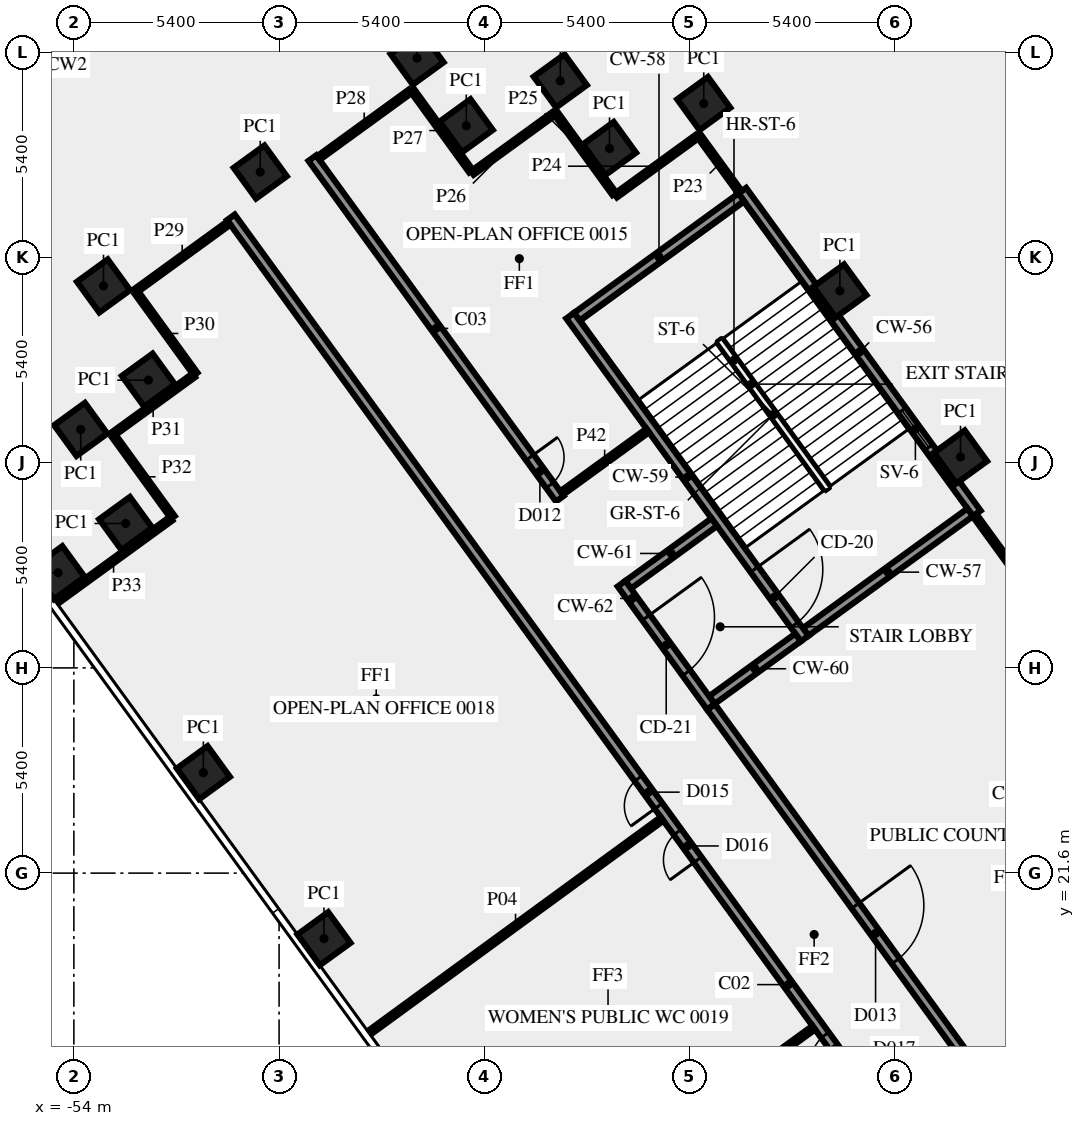
"""IFC4 building model, lengths in metres.
Left out: names, types, materials, properties, quantities, classifications, styles, units other than length and angle.
Written with IfcOpenShell. Run it as: python <this file> out.ifc"""

import sys

from ifc_helpers import new_model, si_unit, direction, frame, frame_2d, origin, origin_2d, place, context, subcontext, project, spatial, rectangle, extrude, element, fill, save


model = new_model("IFC4")
c1 = context("Model", 3, precision=1e-05, world=origin(), true_north=direction((0.0, 1.0)))
c2 = subcontext(c1, "Body", "Model", "MODEL_VIEW")
j1 = project(units=[si_unit("LENGTHUNIT", "METRE"), si_unit("PLANEANGLEUNIT", "RADIAN")], contexts=[c1])
p1 = place(None, origin())
s1 = spatial("IfcSite", under=j1, at=p1, CompositionType="ELEMENT")
p2 = place(p1, origin())
s2 = spatial("IfcBuilding", under=s1, at=p2, CompositionType="ELEMENT")
p3 = place(p2, origin())
s3 = spatial("IfcBuildingStorey", under=s2, at=p3, CompositionType="ELEMENT", Elevation=0.0)
for number, where, z_axis, x_axis in (
    (1, (-30.669, 32.55, 0.0), (0.0, 0.0, 1.0), (-0.588, 0.809, 0.0)),
    (2, (-33.843, 36.919, 0.0), (0.0, 0.0, 1.0), (-0.588, 0.809, 0.0)),
    (3, (-37.425, 41.85, 0.0), (0.0, 0.0, 1.0), (-0.588, 0.809, 0.0)),
    (4, (-39.906, 40.666, 0.0), (0.0, 0.0, 1.0), (-0.588, 0.809, 0.0)),
    (5, (-41.2, 42.445, 0.0), (0.0, 0.0, 1.0), (-0.588, 0.809, 0.0)),
    (6, (-43.675, 41.265, 0.0), (0.0, 0.0, 1.0), (-0.809, -0.588, 0.0)),
    (7, (-44.97, 43.045, 0.0), (0.0, 0.0, 1.0), (-0.809, -0.588, 0.0)),
    (8, (-49.096, 40.047, 0.0), (0.0, 0.0, 1.0), (-0.809, -0.588, 0.0)),
    (9, (-53.22, 37.05, 0.0), (0.0, 0.0, 1.0), (0.588, -0.809, 0.0)),
    (10, (-52.039, 34.571, 0.0), (0.0, 0.0, 1.0), (-0.809, -0.588, 0.0)),
    (11, (-53.82, 33.275, 0.0), (0.0, 0.0, 1.0), (0.588, -0.809, 0.0)),
    (12, (-52.636, 30.8, 0.0), (0.0, 0.0, 1.0), (-0.809, -0.588, 0.0)),
    (13, (-54.415, 29.505, 0.0), (0.0, 0.0, 1.0), (0.588, -0.809, 0.0)),
    (14, (-50.592, 24.243, 0.0), (0.0, 0.0, 1.0), (0.588, -0.809, 0.0)),
    (15, (-47.418, 19.875, 0.0), (0.0, 0.0, 1.0), (0.588, -0.809, 0.0)),
):
    element("IfcColumn", number, at=place(p3, frame(where, z_axis=z_axis, x_axis=x_axis)), inside=s3, PredefinedType="COLUMN", context=c2, shape_type="SweptSolid", body=[
        extrude(rectangle(XDim=1.0, YDim=1.0, at=origin_2d()), origin(), (0.0, 0.0, 1.0), 5.6),
    ])
p4 = place(p3, frame((-30.24, 31.064, 0.0), z_axis=(0.0, 0.0, 1.0), x_axis=(-0.587795589702, 0.809009483706, 0.0)))
e16 = element("IfcWall", 16, at=p4, inside=s3, PredefinedType="SHEAR", context=c2, shape_type="SweptSolid", body=[
    extrude(rectangle(XDim=10.5, YDim=0.25, at=frame_2d((5.25, 0.0))), origin(), (0.0, 0.0, 1.0), 5.6),
])
p5 = place(p4, frame((2.15, 0.0, 1.0)))
e17 = element("IfcOpeningElement", 17, at=p5, cuts=e16, PredefinedType="OPENING", context=c2, shape_type="SweptSolid", body=[
    extrude(rectangle(XDim=1.2, YDim=1.2, at=frame_2d((0.6, 0.6))), frame((0.0, 0.135, 0.0), z_axis=(0.0, -1.0, 0.0), x_axis=(1.0, 0.0, 0.0)), (0.0, 0.0, 1.0), 0.27),
])
p6 = place(p3, frame((-30.414, 31.092, 0.0), z_axis=(0.0, 0.0, 1.0), x_axis=(-0.8089984606, -0.587810760999, 0.0)))
e18 = element("IfcWall", 18, at=p6, inside=s3, PredefinedType="SHEAR", context=c2, shape_type="SweptSolid", body=[
    extrude(rectangle(XDim=5.35, YDim=0.25, at=frame_2d((2.675, 0.0))), origin(), (0.0, 0.0, 1.0), 5.6),
])
p7 = place(p3, frame((-36.439, 39.384, 0.0), z_axis=(0.0, 0.0, 1.0), x_axis=(-0.809020161303, -0.587780893365, 0.0)))
e19 = element("IfcWall", 19, at=p7, inside=s3, PredefinedType="SHEAR", context=c2, shape_type="SweptSolid", body=[
    extrude(rectangle(XDim=5.35, YDim=0.25, at=frame_2d((2.675, 0.0))), origin(), (0.0, 0.0, 1.0), 5.6),
])
p8 = place(p3, frame((-40.942, 36.267, 0.0), z_axis=(0.0, 0.0, 1.0), x_axis=(0.587795589702, -0.809009483706, 0.0)))
e20 = element("IfcWall", 20, at=p8, inside=s3, PredefinedType="SHEAR", context=c2, shape_type="SweptSolid", body=[
    extrude(rectangle(XDim=10.5, YDim=0.25, at=frame_2d((5.25, 0.0))), origin(), (0.0, 0.0, 1.0), 5.6),
])
p9 = place(p8, frame((8.25, 0.0, 0.0)))
e21 = element("IfcOpeningElement", 21, at=p9, cuts=e20, PredefinedType="OPENING", context=c2, shape_type="SweptSolid", body=[
    extrude(rectangle(XDim=1.8, YDim=2.1, at=frame_2d((0.9, 1.05))), frame((0.0, 0.135, 0.0), z_axis=(0.0, -1.0, 0.0), x_axis=(1.0, 0.0, 0.0)), (0.0, 0.0, 1.0), 0.27),
])
for number, where, z_axis, x_axis in (
    (22, (-34.945, 27.8, 0.0), (0.0, 0.0, 1.0), (-0.809, -0.588, 0.0)),
    (23, (-37.149, 30.834, 0.0), (0.0, 0.0, 1.0), (-0.809, -0.588, 0.0)),
):
    element("IfcWall", number, at=place(p3, frame(where, z_axis=z_axis, x_axis=x_axis)), inside=s3, PredefinedType="SHEAR", context=c2, shape_type="SweptSolid", body=[
        extrude(rectangle(XDim=2.8, YDim=0.25, at=frame_2d((1.4, 0.0))), origin(), (0.0, 0.0, 1.0), 5.6),
    ])
p10 = place(p3, frame((-39.589, 29.216, 0.0), z_axis=(0.0, 0.0, 1.0), x_axis=(0.587772420479, -0.809026317077, 0.0)))
e24 = element("IfcWall", 24, at=p10, inside=s3, PredefinedType="SHEAR", context=c2, shape_type="SweptSolid", body=[
    extrude(rectangle(XDim=4.0, YDim=0.25, at=frame_2d((2.0, 0.0))), origin(), (0.0, 0.0, 1.0), 5.6),
])
p11 = place(p10, frame((1.1, 0.0, 0.0)))
e25 = element("IfcOpeningElement", 25, at=p11, cuts=e24, PredefinedType="OPENING", context=c2, shape_type="SweptSolid", body=[
    extrude(rectangle(XDim=1.8, YDim=2.1, at=frame_2d((0.9, 1.05))), frame((0.0, 0.135, 0.0), z_axis=(0.0, -1.0, 0.0), x_axis=(1.0, 0.0, 0.0)), (0.0, 0.0, 1.0), 0.27),
])
p12 = place(p3, frame((-20.531, -1.523, 0.0), z_axis=(0.0, 0.0, 1.0), x_axis=(-0.587784522481, 0.809017524614, 0.0)))
e26 = element("IfcWall", 26, at=p12, inside=s3, PredefinedType="SOLIDWALL", context=c2, shape_type="SweptSolid", body=[
    extrude(rectangle(XDim=49.912, YDim=0.25, at=frame_2d((24.956, 0.0))), origin(), (0.0, 0.0, 1.0), 5.6),
])
p13 = place(p12, frame((30.765, 0.0, 0.0)))
e27 = element("IfcOpeningElement", 27, at=p13, cuts=e26, PredefinedType="OPENING", context=c2, shape_type="SweptSolid", body=[
    extrude(rectangle(XDim=0.9, YDim=2.1, at=frame_2d((0.45, 1.05))), frame((0.0, 0.135, 0.0), z_axis=(0.0, -1.0, 0.0), x_axis=(1.0, 0.0, 0.0)), (0.0, 0.0, 1.0), 0.27),
])
p14 = place(p12, frame((22.416, 0.0, 0.0)))
e28 = element("IfcOpeningElement", 28, at=p14, cuts=e26, PredefinedType="OPENING", context=c2, shape_type="SweptSolid", body=[
    extrude(rectangle(XDim=0.9, YDim=2.1, at=frame_2d((0.45, 1.05))), frame((0.0, 0.135, 0.0), z_axis=(0.0, -1.0, 0.0), x_axis=(1.0, 0.0, 0.0)), (0.0, 0.0, 1.0), 0.27),
])
p15 = place(p12, frame((12.966, 0.0, 0.0)))
e29 = element("IfcOpeningElement", 29, at=p15, cuts=e26, PredefinedType="OPENING", context=c2, shape_type="SweptSolid", body=[
    extrude(rectangle(XDim=0.9, YDim=2.1, at=frame_2d((0.45, 1.05))), frame((0.0, 0.135, 0.0), z_axis=(0.0, -1.0, 0.0), x_axis=(1.0, 0.0, 0.0)), (0.0, 0.0, 1.0), 0.27),
])
p16 = place(p12, frame((29.016, 0.0, 0.0)))
e30 = element("IfcOpeningElement", 30, at=p16, cuts=e26, PredefinedType="OPENING", context=c2, shape_type="SweptSolid", body=[
    extrude(rectangle(XDim=0.9, YDim=2.1, at=frame_2d((0.45, 1.05))), frame((0.0, 0.135, 0.0), z_axis=(0.0, -1.0, 0.0), x_axis=(1.0, 0.0, 0.0)), (0.0, 0.0, 1.0), 0.27),
])
p17 = place(p3, frame((-47.725, 40.414, 0.0), z_axis=(0.0, 0.0, 1.0), x_axis=(0.587773291021, -0.809025684612, 0.0)))
e31 = element("IfcWall", 31, at=p17, inside=s3, PredefinedType="SOLIDWALL", context=c2, shape_type="SweptSolid", body=[
    extrude(rectangle(XDim=11.079, YDim=0.25, at=frame_2d((5.539, 0.0))), origin(), (0.0, 0.0, 1.0), 5.6),
])
p18 = place(p17, frame((9.737, 0.0, 0.0)))
e32 = element("IfcOpeningElement", 32, at=p18, cuts=e31, PredefinedType="OPENING", context=c2, shape_type="SweptSolid", body=[
    extrude(rectangle(XDim=0.9, YDim=2.1, at=frame_2d((0.45, 1.05))), frame((0.0, 0.135, 0.0), z_axis=(0.0, -1.0, 0.0), x_axis=(1.0, 0.0, 0.0)), (0.0, 0.0, 1.0), 0.27),
])
p19 = place(p3, frame((-37.232, 25.972, 0.0), z_axis=(0.0, 0.0, 1.0), x_axis=(0.587786323093, -0.809016216391, 0.0)))
e33 = element("IfcWall", 33, at=p19, inside=s3, PredefinedType="SOLIDWALL", context=c2, shape_type="SweptSolid", body=[
    extrude(rectangle(XDim=33.493, YDim=0.25, at=frame_2d((16.747, 0.0))), origin(), (0.0, 0.0, 1.0), 5.6),
])
p20 = place(p19, frame((6.462, 0.0, 0.0)))
e34 = element("IfcOpeningElement", 34, at=p20, cuts=e33, PredefinedType="OPENING", context=c2, shape_type="SweptSolid", body=[
    extrude(rectangle(XDim=1.8, YDim=2.1, at=frame_2d((0.9, 1.05))), frame((0.0, 0.135, 0.0), z_axis=(0.0, -1.0, 0.0), x_axis=(1.0, 0.0, 0.0)), (0.0, 0.0, 1.0), 0.27),
])
p21 = place(p19, frame((15.085, 0.0, 0.0)))
e35 = element("IfcOpeningElement", 35, at=p21, cuts=e33, PredefinedType="OPENING", context=c2, shape_type="SweptSolid", body=[
    extrude(rectangle(XDim=0.9, YDim=2.1, at=frame_2d((0.45, 1.05))), frame((0.0, 0.135, 0.0), z_axis=(0.0, -1.0, 0.0), x_axis=(1.0, 0.0, 0.0)), (0.0, 0.0, 1.0), 0.27),
])
p22 = place(p3, frame((-46.234, 17.394, 0.0), z_axis=(0.0, 0.0, 1.0), x_axis=(0.807606997933, 0.589721067023, 0.0)))
e36 = element("IfcWall", 36, at=p22, inside=s3, PredefinedType="PARTITIONING", context=c2, shape_type="SweptSolid", body=[
    extrude(rectangle(XDim=9.55, YDim=0.12, at=frame_2d((4.775, 0.0))), origin(), (0.0, 0.0, 1.0), 4.6),
])
p23 = place(p3, frame((-34.53, 17.533, 0.0), z_axis=(0.0, 0.0, 1.0), x_axis=(-0.809048817734, -0.587741448702, 0.0)))
e37 = element("IfcWall", 37, at=p23, inside=s3, PredefinedType="PARTITIONING", context=c2, shape_type="SweptSolid", body=[
    extrude(rectangle(XDim=9.55, YDim=0.12, at=frame_2d((4.775, 0.0))), origin(), (0.0, 0.0, 1.0), 4.6),
])
p24 = place(p3, frame((-36.472, 39.515, 0.0), z_axis=(0.0, 0.0, 1.0), x_axis=(-0.587849827043, 0.808970074135, 0.0)))
e38 = element("IfcWall", 38, at=p24, inside=s3, PredefinedType="PARTITIONING", context=c2, shape_type="SweptSolid", body=[
    extrude(rectangle(XDim=1.849, YDim=0.12, at=frame_2d((0.925, 0.0))), origin(), (0.0, 0.0, 1.0), 5.6),
])
p25 = place(p3, frame((-37.608, 40.976, 0.0), z_axis=(0.0, 0.0, 1.0), x_axis=(-0.809247697456, -0.587467585627, 0.0)))
e39 = element("IfcWall", 39, at=p25, inside=s3, PredefinedType="PARTITIONING", context=c2, shape_type="SweptSolid", body=[
    extrude(rectangle(XDim=2.64, YDim=0.12, at=frame_2d((1.32, 0.0))), origin(), (0.0, 0.0, 1.0), 5.6),
])
p26 = place(p3, frame((-39.779, 39.473, 0.0), z_axis=(0.0, 0.0, 1.0), x_axis=(-0.587841698287, 0.80897598095, 0.0)))
e40 = element("IfcWall", 40, at=p26, inside=s3, PredefinedType="PARTITIONING", context=c2, shape_type="SweptSolid", body=[
    extrude(rectangle(XDim=2.64, YDim=0.12, at=frame_2d((1.32, 0.0))), origin(), (0.0, 0.0, 1.0), 5.6),
])
p27 = place(p3, frame((-41.38, 41.574, 0.0), z_axis=(0.0, 0.0, 1.0), x_axis=(-0.809279612282, -0.587423619839, 0.0)))
e41 = element("IfcWall", 41, at=p27, inside=s3, PredefinedType="PARTITIONING", context=c2, shape_type="SweptSolid", body=[
    extrude(rectangle(XDim=2.64, YDim=0.12, at=frame_2d((1.32, 0.0))), origin(), (0.0, 0.0, 1.0), 5.6),
])
p28 = place(p3, frame((-43.551, 40.072, 0.0), z_axis=(0.0, 0.0, 1.0), x_axis=(-0.587775481884, 0.809024092902, 0.0)))
e42 = element("IfcWall", 42, at=p28, inside=s3, PredefinedType="PARTITIONING", context=c2, shape_type="SweptSolid", body=[
    extrude(rectangle(XDim=2.638, YDim=0.12, at=frame_2d((1.319, 0.0))), origin(), (0.0, 0.0, 1.0), 5.6),
])
p29 = place(p3, frame((-45.15, 42.171, 0.0), z_axis=(0.0, 0.0, 1.0), x_axis=(-0.809085427997, -0.58769104996, 0.0)))
e43 = element("IfcWall", 43, at=p29, inside=s3, PredefinedType="PARTITIONING", context=c2, shape_type="SweptSolid", body=[
    extrude(rectangle(XDim=2.991, YDim=0.12, at=frame_2d((1.495, 0.0))), origin(), (0.0, 0.0, 1.0), 5.6),
])
p30 = place(p3, frame((-49.916, 38.709, 0.0), z_axis=(0.0, 0.0, 1.0), x_axis=(-0.808929897094, -0.587905112742, 0.0)))
e44 = element("IfcWall", 44, at=p30, inside=s3, PredefinedType="PARTITIONING", context=c2, shape_type="SweptSolid", body=[
    extrude(rectangle(XDim=3.05, YDim=0.12, at=frame_2d((1.525, 0.0))), origin(), (0.0, 0.0, 1.0), 5.6),
])
p31 = place(p3, frame((-52.348, 36.867, 0.0), z_axis=(0.0, 0.0, 1.0), x_axis=(0.587538940835, -0.809195892848, 0.0)))
e45 = element("IfcWall", 45, at=p31, inside=s3, PredefinedType="PARTITIONING", context=c2, shape_type="SweptSolid", body=[
    extrude(rectangle(XDim=2.639, YDim=0.12, at=frame_2d((1.319, 0.0))), origin(), (0.0, 0.0, 1.0), 5.6),
])
p32 = place(p3, frame((-50.845, 34.697, 0.0), z_axis=(0.0, 0.0, 1.0), x_axis=(-0.80897598095, -0.587841698287, 0.0)))
e46 = element("IfcWall", 46, at=p32, inside=s3, PredefinedType="PARTITIONING", context=c2, shape_type="SweptSolid", body=[
    extrude(rectangle(XDim=2.64, YDim=0.12, at=frame_2d((1.32, 0.0))), origin(), (0.0, 0.0, 1.0), 5.6),
])
p33 = place(p3, frame((-52.946, 33.096, 0.0), z_axis=(0.0, 0.0, 1.0), x_axis=(0.587423619839, -0.809279612282, 0.0)))
e47 = element("IfcWall", 47, at=p33, inside=s3, PredefinedType="PARTITIONING", context=c2, shape_type="SweptSolid", body=[
    extrude(rectangle(XDim=2.64, YDim=0.12, at=frame_2d((1.32, 0.0))), origin(), (0.0, 0.0, 1.0), 5.6),
])
p34 = place(p3, frame((-51.444, 30.925, 0.0), z_axis=(0.0, 0.0, 1.0), x_axis=(-0.808829261721, -0.588043557387, 0.0)))
e48 = element("IfcWall", 48, at=p34, inside=s3, PredefinedType="PARTITIONING", context=c2, shape_type="SweptSolid", body=[
    extrude(rectangle(XDim=3.739, YDim=0.12, at=frame_2d((1.869, 0.0))), origin(), (0.0, 0.0, 1.0), 4.6),
])
p35 = place(p3, frame((-21.633, 19.091, 0.0), z_axis=(0.0, 0.0, 1.0), x_axis=(-0.587789647109, 0.809013801335, 0.0)))
e49 = element("IfcWall", 49, at=p35, inside=s3, PredefinedType="PARTITIONING", context=c2, shape_type="SweptSolid", body=[
    extrude(rectangle(XDim=14.745, YDim=0.12, at=frame_2d((7.373, 0.0))), origin(), (0.0, 0.0, 1.0), 5.6),
])
p36 = place(p3, frame((-41.166, 31.599, 0.0), z_axis=(0.0, 0.0, 1.0), x_axis=(0.809090262332, 0.587684394381, 0.0)))
e50 = element("IfcWall", 50, at=p36, inside=s3, PredefinedType="PARTITIONING", context=c2, shape_type="SweptSolid", body=[
    extrude(rectangle(XDim=2.801, YDim=0.12, at=frame_2d((1.4, 0.0))), origin(), (0.0, 0.0, 1.0), 5.6),
])
p37 = place(p5, origin())
e51 = element("IfcWindow", 51, at=p37, inside=s3, PartitioningType="SINGLE_PANEL", PredefinedType="WINDOW", context=c2, shape_type="SweptSolid", body=[
    extrude(rectangle(XDim=1.2, YDim=1.2, at=frame_2d((0.6, 0.6))), frame((0.0, 0.03, 0.0), z_axis=(0.0, -1.0, 0.0), x_axis=(1.0, 0.0, 0.0)), (0.0, 0.0, 1.0), 0.06),
])
fill(e17, e51)
p38 = place(p9, origin())
e52 = element("IfcDoor", 52, at=p38, inside=s3, OperationType="DOUBLE_DOOR_SINGLE_SWING", PredefinedType="DOOR", context=c2, shape_type="SweptSolid", body=[
    extrude(rectangle(XDim=1.8, YDim=2.1, at=frame_2d((0.9, 1.05))), frame((0.0, 0.025, 0.0), z_axis=(0.0, -1.0, 0.0), x_axis=(1.0, 0.0, 0.0)), (0.0, 0.0, 1.0), 0.05),
])
fill(e21, e52)
p39 = place(p11, origin())
e53 = element("IfcDoor", 53, at=p39, inside=s3, OperationType="DOUBLE_DOOR_SINGLE_SWING", PredefinedType="DOOR", context=c2, shape_type="SweptSolid", body=[
    extrude(rectangle(XDim=1.8, YDim=2.1, at=frame_2d((0.9, 1.05))), frame((0.0, 0.025, 0.0), z_axis=(0.0, -1.0, 0.0), x_axis=(1.0, 0.0, 0.0)), (0.0, 0.0, 1.0), 0.05),
])
fill(e25, e53)
p40 = place(p18, origin())
e54 = element("IfcDoor", 54, at=p40, inside=s3, OperationType="SINGLE_SWING_RIGHT", PredefinedType="DOOR", context=c2, shape_type="SweptSolid", body=[
    extrude(rectangle(XDim=0.9, YDim=2.1, at=frame_2d((0.45, 1.05))), frame((0.0, 0.025, 0.0), z_axis=(0.0, -1.0, 0.0), x_axis=(1.0, 0.0, 0.0)), (0.0, 0.0, 1.0), 0.05),
])
fill(e32, e54)
p41 = place(p13, origin())
e55 = element("IfcDoor", 55, at=p41, inside=s3, OperationType="SINGLE_SWING_LEFT", PredefinedType="DOOR", context=c2, shape_type="SweptSolid", body=[
    extrude(rectangle(XDim=0.9, YDim=2.1, at=frame_2d((0.45, 1.05))), frame((0.0, 0.025, 0.0), z_axis=(0.0, -1.0, 0.0), x_axis=(1.0, 0.0, 0.0)), (0.0, 0.0, 1.0), 0.05),
])
fill(e27, e55)
p42 = place(p14, origin())
e56 = element("IfcDoor", 56, at=p42, inside=s3, OperationType="SINGLE_SWING_RIGHT", PredefinedType="DOOR", context=c2, shape_type="SweptSolid", body=[
    extrude(rectangle(XDim=0.9, YDim=2.1, at=frame_2d((0.45, 1.05))), frame((0.0, 0.025, 0.0), z_axis=(0.0, -1.0, 0.0), x_axis=(1.0, 0.0, 0.0)), (0.0, 0.0, 1.0), 0.05),
])
fill(e28, e56)
p43 = place(p20, origin())
e57 = element("IfcDoor", 57, at=p43, inside=s3, OperationType="DOUBLE_DOOR_SINGLE_SWING", PredefinedType="DOOR", context=c2, shape_type="SweptSolid", body=[
    extrude(rectangle(XDim=1.8, YDim=2.1, at=frame_2d((0.9, 1.05))), frame((0.0, 0.025, 0.0), z_axis=(0.0, -1.0, 0.0), x_axis=(1.0, 0.0, 0.0)), (0.0, 0.0, 1.0), 0.05),
])
fill(e34, e57)
p44 = place(p16, origin())
e58 = element("IfcDoor", 58, at=p44, inside=s3, OperationType="SINGLE_SWING_RIGHT", PredefinedType="DOOR", context=c2, shape_type="SweptSolid", body=[
    extrude(rectangle(XDim=0.9, YDim=2.1, at=frame_2d((0.45, 1.05))), frame((0.0, 0.025, 0.0), z_axis=(0.0, -1.0, 0.0), x_axis=(1.0, 0.0, 0.0)), (0.0, 0.0, 1.0), 0.05),
])
fill(e30, e58)
save(model, sys.argv[1])
